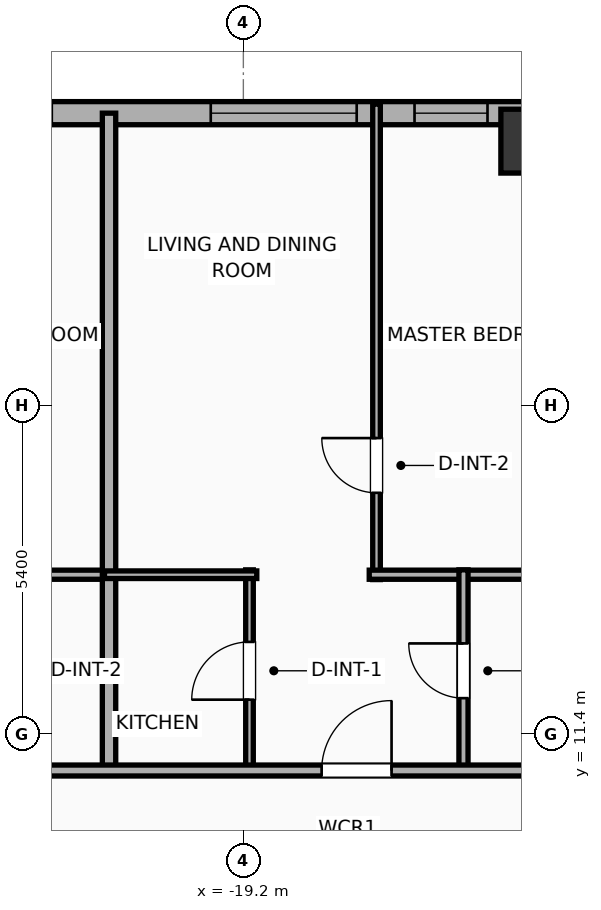
"""IFC4 building model, lengths in metres.
Left out: names, types, materials, properties, quantities, classifications, styles, units other than length and angle.
Written with IfcOpenShell. Run it as: python <this file> out.ifc"""

import sys

from ifc_helpers import new_model, si_unit, direction, frame, frame_2d, origin, origin_2d, place, context, subcontext, project, spatial, rectangle, hollow_rectangle, extrude, element, fill, save


model = new_model("IFC4")
c1 = context("Model", 3, precision=1e-05, world=origin(), true_north=direction((0.0, 1.0)))
c2 = subcontext(c1, "Body", "Model", "MODEL_VIEW")
j1 = project(units=[si_unit("LENGTHUNIT", "METRE"), si_unit("PLANEANGLEUNIT", "RADIAN")], contexts=[c1])
p1 = place(None, origin())
s1 = spatial("IfcSite", under=j1, at=p1, CompositionType="ELEMENT")
p2 = place(p1, origin())
s2 = spatial("IfcBuilding", under=s1, at=p2, CompositionType="ELEMENT")
p3 = place(p2, frame((0.0, 0.0, 132.6)))
s3 = spatial("IfcBuildingStorey", under=s2, at=p3, CompositionType="ELEMENT", Elevation=132.6)
p4 = place(p3, frame((-14.44, 21.15, 0.0), z_axis=(0.0, 0.0, 1.0), x_axis=(1.0, 0.0, 0.0)))
e1 = element("IfcColumn", 1, at=p4, inside=s3, PredefinedType="COLUMN", context=c2, shape_type="SweptSolid", body=[
    extrude(hollow_rectangle(XDim=1.05, YDim=1.05, WallThickness=0.036, at=origin_2d()), origin(), (0.0, 0.0, 1.0), 3.9),
])
p5 = place(p3, frame((-25.381, 21.61, 0.0), z_axis=(0.0, 0.0, 1.0), x_axis=(1.0, 0.0, 0.0)))
e2 = element("IfcWall", 2, at=p5, inside=s3, PredefinedType="ELEMENTEDWALL", context=c2, shape_type="SweptSolid", body=[
    extrude(rectangle(XDim=54.763, YDim=0.38, at=frame_2d((27.381, 0.0))), origin(), (0.0, 0.0, 1.0), 3.65),
])
p6 = place(p5, frame((5.645, 0.0, 0.75)))
e3 = element("IfcOpeningElement", 3, at=p6, cuts=e2, PredefinedType="OPENING", context=c2, shape_type="SweptSolid", body=[
    extrude(rectangle(XDim=2.4, YDim=2.1, at=frame_2d((1.2, 1.05))), frame((0.0, 0.2, 0.0), z_axis=(0.0, -1.0, 0.0), x_axis=(1.0, 0.0, 0.0)), (0.0, 0.0, 1.0), 0.4),
])
p7 = place(p5, frame((45.067, 0.0, 0.75)))
e4 = element("IfcOpeningElement", 4, at=p7, cuts=e2, PredefinedType="OPENING", context=c2, shape_type="SweptSolid", body=[
    extrude(rectangle(XDim=2.4, YDim=2.1, at=frame_2d((1.2, 1.05))), frame((0.0, 0.2, 0.0), z_axis=(0.0, -1.0, 0.0), x_axis=(1.0, 0.0, 0.0)), (0.0, 0.0, 1.0), 0.4),
])
p8 = place(p5, frame((1.831, 0.0, 0.75)))
e5 = element("IfcOpeningElement", 5, at=p8, cuts=e2, PredefinedType="OPENING", context=c2, shape_type="SweptSolid", body=[
    extrude(rectangle(XDim=1.2, YDim=2.05, at=frame_2d((0.6, 1.025))), frame((0.0, 0.2, 0.0), z_axis=(0.0, -1.0, 0.0), x_axis=(1.0, 0.0, 0.0)), (0.0, 0.0, 1.0), 0.4),
])
p9 = place(p5, frame((8.996, 0.0, 0.75)))
e6 = element("IfcOpeningElement", 6, at=p9, cuts=e2, PredefinedType="OPENING", context=c2, shape_type="SweptSolid", body=[
    extrude(rectangle(XDim=1.2, YDim=2.05, at=frame_2d((0.6, 1.025))), frame((0.0, 0.2, 0.0), z_axis=(0.0, -1.0, 0.0), x_axis=(1.0, 0.0, 0.0)), (0.0, 0.0, 1.0), 0.4),
])
p10 = place(p5, frame((15.102, 0.0, 0.75)))
e7 = element("IfcOpeningElement", 7, at=p10, cuts=e2, PredefinedType="OPENING", context=c2, shape_type="SweptSolid", body=[
    extrude(rectangle(XDim=1.2, YDim=2.05, at=frame_2d((0.6, 1.025))), frame((0.0, 0.2, 0.0), z_axis=(0.0, -1.0, 0.0), x_axis=(1.0, 0.0, 0.0)), (0.0, 0.0, 1.0), 0.4),
])
p11 = place(p5, frame((12.352, 0.0, 0.75)))
e8 = element("IfcOpeningElement", 8, at=p11, cuts=e2, PredefinedType="OPENING", context=c2, shape_type="SweptSolid", body=[
    extrude(rectangle(XDim=1.2, YDim=2.05, at=frame_2d((0.6, 1.025))), frame((0.0, 0.2, 0.0), z_axis=(0.0, -1.0, 0.0), x_axis=(1.0, 0.0, 0.0)), (0.0, 0.0, 1.0), 0.4),
])
p12 = place(p5, frame((19.936, 0.0, 0.75)))
e9 = element("IfcOpeningElement", 9, at=p12, cuts=e2, PredefinedType="OPENING", context=c2, shape_type="SweptSolid", body=[
    extrude(rectangle(XDim=1.2, YDim=2.05, at=frame_2d((0.6, 1.025))), frame((0.0, 0.2, 0.0), z_axis=(0.0, -1.0, 0.0), x_axis=(1.0, 0.0, 0.0)), (0.0, 0.0, 1.0), 0.4),
])
p13 = place(p5, frame((17.786, 0.0, 0.75)))
e10 = element("IfcOpeningElement", 10, at=p13, cuts=e2, PredefinedType="OPENING", context=c2, shape_type="SweptSolid", body=[
    extrude(rectangle(XDim=1.2, YDim=2.05, at=frame_2d((0.6, 1.025))), frame((0.0, 0.2, 0.0), z_axis=(0.0, -1.0, 0.0), x_axis=(1.0, 0.0, 0.0)), (0.0, 0.0, 1.0), 0.4),
])
p14 = place(p5, frame((23.826, 0.0, 0.75)))
e11 = element("IfcOpeningElement", 11, at=p14, cuts=e2, PredefinedType="OPENING", context=c2, shape_type="SweptSolid", body=[
    extrude(rectangle(XDim=1.2, YDim=2.05, at=frame_2d((0.6, 1.025))), frame((0.0, 0.2, 0.0), z_axis=(0.0, -1.0, 0.0), x_axis=(1.0, 0.0, 0.0)), (0.0, 0.0, 1.0), 0.4),
])
p15 = place(p5, frame((26.576, 0.0, 0.75)))
e12 = element("IfcOpeningElement", 12, at=p15, cuts=e2, PredefinedType="OPENING", context=c2, shape_type="SweptSolid", body=[
    extrude(rectangle(XDim=1.2, YDim=2.05, at=frame_2d((0.6, 1.025))), frame((0.0, 0.2, 0.0), z_axis=(0.0, -1.0, 0.0), x_axis=(1.0, 0.0, 0.0)), (0.0, 0.0, 1.0), 0.4),
])
p16 = place(p5, frame((30.431, 0.0, 0.75)))
e13 = element("IfcOpeningElement", 13, at=p16, cuts=e2, PredefinedType="OPENING", context=c2, shape_type="SweptSolid", body=[
    extrude(rectangle(XDim=1.2, YDim=2.05, at=frame_2d((0.6, 1.025))), frame((0.0, 0.2, 0.0), z_axis=(0.0, -1.0, 0.0), x_axis=(1.0, 0.0, 0.0)), (0.0, 0.0, 1.0), 0.4),
])
p17 = place(p5, frame((38.581, 0.0, 0.75)))
e14 = element("IfcOpeningElement", 14, at=p17, cuts=e2, PredefinedType="OPENING", context=c2, shape_type="SweptSolid", body=[
    extrude(rectangle(XDim=1.2, YDim=2.05, at=frame_2d((0.6, 1.025))), frame((0.0, 0.2, 0.0), z_axis=(0.0, -1.0, 0.0), x_axis=(1.0, 0.0, 0.0)), (0.0, 0.0, 1.0), 0.4),
])
p18 = place(p5, frame((34.786, 0.0, 0.75)))
e15 = element("IfcOpeningElement", 15, at=p18, cuts=e2, PredefinedType="OPENING", context=c2, shape_type="SweptSolid", body=[
    extrude(rectangle(XDim=1.2, YDim=2.05, at=frame_2d((0.6, 1.025))), frame((0.0, 0.2, 0.0), z_axis=(0.0, -1.0, 0.0), x_axis=(1.0, 0.0, 0.0)), (0.0, 0.0, 1.0), 0.4),
])
p19 = place(p5, frame((41.876, 0.0, 0.75)))
e16 = element("IfcOpeningElement", 16, at=p19, cuts=e2, PredefinedType="OPENING", context=c2, shape_type="SweptSolid", body=[
    extrude(rectangle(XDim=1.2, YDim=2.05, at=frame_2d((0.6, 1.025))), frame((0.0, 0.2, 0.0), z_axis=(0.0, -1.0, 0.0), x_axis=(1.0, 0.0, 0.0)), (0.0, 0.0, 1.0), 0.4),
])
p20 = place(p5, frame((49.385, 0.0, 0.75)))
e17 = element("IfcOpeningElement", 17, at=p20, cuts=e2, PredefinedType="OPENING", context=c2, shape_type="SweptSolid", body=[
    extrude(rectangle(XDim=1.2, YDim=2.05, at=frame_2d((0.6, 1.025))), frame((0.0, 0.2, 0.0), z_axis=(0.0, -1.0, 0.0), x_axis=(1.0, 0.0, 0.0)), (0.0, 0.0, 1.0), 0.4),
])
p21 = place(p5, frame((52.181, 0.0, 0.75)))
e18 = element("IfcOpeningElement", 18, at=p21, cuts=e2, PredefinedType="OPENING", context=c2, shape_type="SweptSolid", body=[
    extrude(rectangle(XDim=1.2, YDim=2.05, at=frame_2d((0.6, 1.025))), frame((0.0, 0.2, 0.0), z_axis=(0.0, -1.0, 0.0), x_axis=(1.0, 0.0, 0.0)), (0.0, 0.0, 1.0), 0.4),
])
p22 = place(p3, frame((-24.939, 14.02, 0.0), z_axis=(0.0, 0.0, 1.0), x_axis=(1.0, 0.0, 0.0)))
e19 = element("IfcWall", 19, at=p22, inside=s3, PredefinedType="PLUMBINGWALL", context=c2, shape_type="SweptSolid", body=[
    extrude(rectangle(XDim=3.605, YDim=0.15, at=frame_2d((1.802, 0.0))), origin(), (0.0, 0.0, 1.0), 3.65),
])
p23 = place(p3, frame((-21.409, 10.72, 0.0), z_axis=(0.0, 0.0, 1.0), x_axis=(0.0, 1.0, 0.0)))
e20 = element("IfcWall", 20, at=p23, inside=s3, PredefinedType="PARTITIONING", context=c2, shape_type="SweptSolid", body=[
    extrude(rectangle(XDim=10.89, YDim=0.22, at=frame_2d((5.445, 0.0))), origin(), (0.0, 0.0, 1.0), 3.65),
])
p24 = place(p3, frame((-17.01, 13.94, 0.0), z_axis=(0.0, 0.0, 1.0), x_axis=(0.0, 1.0, 0.0)))
e21 = element("IfcWall", 21, at=p24, inside=s3, PredefinedType="PARTITIONING", context=c2, shape_type="SweptSolid", body=[
    extrude(rectangle(XDim=7.82, YDim=0.125, at=frame_2d((3.91, 0.0))), origin(), (0.0, 0.0, 1.0), 3.65),
])
p25 = place(p24, frame((1.427, 0.0, 0.0)))
e22 = element("IfcOpeningElement", 22, at=p25, cuts=e21, PredefinedType="OPENING", context=c2, shape_type="SweptSolid", body=[
    extrude(rectangle(XDim=0.9, YDim=2.05, at=frame_2d((0.45, 1.025))), frame((0.0, 0.073, 0.0), z_axis=(0.0, -1.0, 0.0), x_axis=(1.0, 0.0, 0.0)), (0.0, 0.0, 1.0), 0.145),
])
p26 = place(p3, frame((-17.13, 14.02, 0.0), z_axis=(0.0, 0.0, 1.0), x_axis=(1.0, 0.0, 0.0)))
e23 = element("IfcWall", 23, at=p26, inside=s3, PredefinedType="PLUMBINGWALL", context=c2, shape_type="SweptSolid", body=[
    extrude(rectangle(XDim=3.79, YDim=0.15, at=frame_2d((1.895, 0.0))), origin(), (0.0, 0.0, 1.0), 3.65),
])
p27 = place(p3, frame((-19.099, 10.78, 0.0), z_axis=(0.0, 0.0, 1.0), x_axis=(0.0, 1.0, 0.0)))
e24 = element("IfcWall", 24, at=p27, inside=s3, PredefinedType="PARTITIONING", context=c2, shape_type="SweptSolid", body=[
    extrude(rectangle(XDim=3.32, YDim=0.125, at=frame_2d((1.66, 0.0))), origin(), (0.0, 0.0, 1.0), 3.65),
])
p28 = place(p27, frame((1.185, 0.0, 0.0)))
e25 = element("IfcOpeningElement", 25, at=p28, cuts=e24, PredefinedType="OPENING", context=c2, shape_type="SweptSolid", body=[
    extrude(rectangle(XDim=0.95, YDim=2.05, at=frame_2d((0.475, 1.025))), frame((0.0, 0.073, 0.0), z_axis=(0.0, -1.0, 0.0), x_axis=(1.0, 0.0, 0.0)), (0.0, 0.0, 1.0), 0.145),
])
p29 = place(p3, frame((-21.484, 14.02, 0.0), z_axis=(0.0, 0.0, 1.0), x_axis=(1.0, 0.0, 0.0)))
e26 = element("IfcWall", 26, at=p29, inside=s3, PredefinedType="PARTITIONING", context=c2, shape_type="SweptSolid", body=[
    extrude(rectangle(XDim=2.505, YDim=0.125, at=frame_2d((1.252, 0.0))), origin(), (0.0, 0.0, 1.0), 3.65),
])
p30 = place(p3, frame((-15.58, 10.78, 0.0), z_axis=(0.0, 0.0, 1.0), x_axis=(0.0, 1.0, 0.0)))
e27 = element("IfcWall", 27, at=p30, inside=s3, PredefinedType="PLUMBINGWALL", context=c2, shape_type="SweptSolid", body=[
    extrude(rectangle(XDim=3.32, YDim=0.15, at=frame_2d((1.66, 0.0))), origin(), (0.0, 0.0, 1.0), 3.65),
])
p31 = place(p30, frame((1.21, 0.0, 0.0)))
e28 = element("IfcOpeningElement", 28, at=p31, cuts=e27, PredefinedType="OPENING", context=c2, shape_type="SweptSolid", body=[
    extrude(rectangle(XDim=0.9, YDim=2.05, at=frame_2d((0.45, 1.025))), frame((0.0, 0.085, 0.0), z_axis=(0.0, -1.0, 0.0), x_axis=(1.0, 0.0, 0.0)), (0.0, 0.0, 1.0), 0.17),
])
p32 = place(p3, frame((-29.21, 10.8, 0.0), z_axis=(0.0, 0.0, 1.0), x_axis=(1.0, 0.0, 0.0)))
e29 = element("IfcWall", 29, at=p32, inside=s3, PredefinedType="PARTITIONING", context=c2, shape_type="SweptSolid", body=[
    extrude(rectangle(XDim=62.42, YDim=0.18, at=frame_2d((31.21, 0.0))), origin(), (0.0, 0.0, 1.0), 3.65),
])
p33 = place(p32, frame((3.457, 0.0, 0.0)))
e30 = element("IfcOpeningElement", 30, at=p33, cuts=e29, PredefinedType="OPENING", context=c2, shape_type="SweptSolid", body=[
    extrude(rectangle(XDim=1.15, YDim=2.05, at=frame_2d((0.575, 1.025))), frame((0.0, 0.1, 0.0), z_axis=(0.0, -1.0, 0.0), x_axis=(1.0, 0.0, 0.0)), (0.0, 0.0, 1.0), 0.2),
])
p34 = place(p32, frame((11.297, 0.0, 0.0)))
e31 = element("IfcOpeningElement", 31, at=p34, cuts=e29, PredefinedType="OPENING", context=c2, shape_type="SweptSolid", body=[
    extrude(rectangle(XDim=1.15, YDim=2.05, at=frame_2d((0.575, 1.025))), frame((0.0, 0.1, 0.0), z_axis=(0.0, -1.0, 0.0), x_axis=(1.0, 0.0, 0.0)), (0.0, 0.0, 1.0), 0.2),
])
p35 = place(p32, frame((18.925, 0.0, 0.0)))
e32 = element("IfcOpeningElement", 32, at=p35, cuts=e29, PredefinedType="OPENING", context=c2, shape_type="SweptSolid", body=[
    extrude(rectangle(XDim=1.15, YDim=2.05, at=frame_2d((0.575, 1.025))), frame((0.0, 0.1, 0.0), z_axis=(0.0, -1.0, 0.0), x_axis=(1.0, 0.0, 0.0)), (0.0, 0.0, 1.0), 0.2),
])
p36 = place(p32, frame((24.362, 0.0, 0.0)))
e33 = element("IfcOpeningElement", 33, at=p36, cuts=e29, PredefinedType="OPENING", context=c2, shape_type="SweptSolid", body=[
    extrude(rectangle(XDim=1.15, YDim=2.05, at=frame_2d((0.575, 1.025))), frame((0.0, 0.1, 0.0), z_axis=(0.0, -1.0, 0.0), x_axis=(1.0, 0.0, 0.0)), (0.0, 0.0, 1.0), 0.2),
])
p37 = place(p32, frame((27.708, 0.0, 0.0)))
e34 = element("IfcOpeningElement", 34, at=p37, cuts=e29, PredefinedType="OPENING", context=c2, shape_type="SweptSolid", body=[
    extrude(rectangle(XDim=1.15, YDim=2.05, at=frame_2d((0.575, 1.025))), frame((0.0, 0.1, 0.0), z_axis=(0.0, -1.0, 0.0), x_axis=(1.0, 0.0, 0.0)), (0.0, 0.0, 1.0), 0.2),
])
p38 = place(p32, frame((34.618, 0.0, 0.0)))
e35 = element("IfcOpeningElement", 35, at=p38, cuts=e29, PredefinedType="OPENING", context=c2, shape_type="SweptSolid", body=[
    extrude(rectangle(XDim=0.9, YDim=2.05, at=frame_2d((0.45, 1.025))), frame((0.0, 0.1, 0.0), z_axis=(0.0, -1.0, 0.0), x_axis=(1.0, 0.0, 0.0)), (0.0, 0.0, 1.0), 0.2),
])
p39 = place(p32, frame((43.106, 0.0, 0.0)))
e36 = element("IfcOpeningElement", 36, at=p39, cuts=e29, PredefinedType="OPENING", context=c2, shape_type="SweptSolid", body=[
    extrude(rectangle(XDim=1.15, YDim=2.05, at=frame_2d((0.575, 1.025))), frame((0.0, 0.1, 0.0), z_axis=(0.0, -1.0, 0.0), x_axis=(1.0, 0.0, 0.0)), (0.0, 0.0, 1.0), 0.2),
])
p40 = place(p32, frame((51.777, 0.0, 0.0)))
e37 = element("IfcOpeningElement", 37, at=p40, cuts=e29, PredefinedType="OPENING", context=c2, shape_type="SweptSolid", body=[
    extrude(rectangle(XDim=0.9, YDim=2.05, at=frame_2d((0.45, 1.025))), frame((0.0, 0.1, 0.0), z_axis=(0.0, -1.0, 0.0), x_axis=(1.0, 0.0, 0.0)), (0.0, 0.0, 1.0), 0.2),
])
p41 = place(p32, frame((58.718, 0.0, 0.0)))
e38 = element("IfcOpeningElement", 38, at=p41, cuts=e29, PredefinedType="OPENING", context=c2, shape_type="SweptSolid", body=[
    extrude(rectangle(XDim=0.9, YDim=2.05, at=frame_2d((0.45, 1.025))), frame((0.0, 0.1, 0.0), z_axis=(0.0, -1.0, 0.0), x_axis=(1.0, 0.0, 0.0)), (0.0, 0.0, 1.0), 0.2),
])
p42 = place(p6, origin())
e39 = element("IfcWindow", 39, at=p42, inside=s3, PartitioningType="SINGLE_PANEL", PredefinedType="WINDOW", context=c2, shape_type="SweptSolid", body=[
    extrude(rectangle(XDim=2.4, YDim=2.1, at=frame_2d((1.2, 1.05))), frame((0.0, 0.03, 0.0), z_axis=(0.0, -1.0, 0.0), x_axis=(1.0, 0.0, 0.0)), (0.0, 0.0, 1.0), 0.06),
])
fill(e3, e39)
p43 = place(p9, origin())
e40 = element("IfcWindow", 40, at=p43, inside=s3, PartitioningType="SINGLE_PANEL", PredefinedType="WINDOW", context=c2, shape_type="SweptSolid", body=[
    extrude(rectangle(XDim=1.2, YDim=2.05, at=frame_2d((0.6, 1.025))), frame((0.0, 0.03, 0.0), z_axis=(0.0, -1.0, 0.0), x_axis=(1.0, 0.0, 0.0)), (0.0, 0.0, 1.0), 0.06),
])
fill(e6, e40)
p44 = place(p25, origin())
e41 = element("IfcDoor", 41, at=p44, inside=s3, OperationType="SINGLE_SWING_RIGHT", PredefinedType="DOOR", context=c2, shape_type="SweptSolid", body=[
    extrude(rectangle(XDim=0.9, YDim=2.05, at=frame_2d((0.45, 1.025))), frame((0.0, 0.025, 0.0), z_axis=(0.0, -1.0, 0.0), x_axis=(1.0, 0.0, 0.0)), (0.0, 0.0, 1.0), 0.05),
])
fill(e22, e41)
p45 = place(p28, origin())
e42 = element("IfcDoor", 42, at=p45, inside=s3, OperationType="SINGLE_SWING_LEFT", PredefinedType="DOOR", context=c2, shape_type="SweptSolid", body=[
    extrude(rectangle(XDim=0.95, YDim=2.05, at=frame_2d((0.475, 1.025))), frame((0.0, 0.025, 0.0), z_axis=(0.0, -1.0, 0.0), x_axis=(1.0, 0.0, 0.0)), (0.0, 0.0, 1.0), 0.05),
])
fill(e25, e42)
p46 = place(p31, origin())
e43 = element("IfcDoor", 43, at=p46, inside=s3, OperationType="SINGLE_SWING_RIGHT", PredefinedType="DOOR", context=c2, shape_type="SweptSolid", body=[
    extrude(rectangle(XDim=0.9, YDim=2.05, at=frame_2d((0.45, 1.025))), frame((0.0, 0.025, 0.0), z_axis=(0.0, -1.0, 0.0), x_axis=(1.0, 0.0, 0.0)), (0.0, 0.0, 1.0), 0.05),
])
fill(e28, e43)
p47 = place(p34, origin())
e44 = element("IfcDoor", 44, at=p47, inside=s3, OperationType="SINGLE_SWING_RIGHT", PredefinedType="DOOR", context=c2, shape_type="SweptSolid", body=[
    extrude(rectangle(XDim=1.15, YDim=2.05, at=frame_2d((0.575, 1.025))), frame((0.0, 0.025, 0.0), z_axis=(0.0, -1.0, 0.0), x_axis=(1.0, 0.0, 0.0)), (0.0, 0.0, 1.0), 0.05),
])
fill(e31, e44)
save(model, sys.argv[1])
